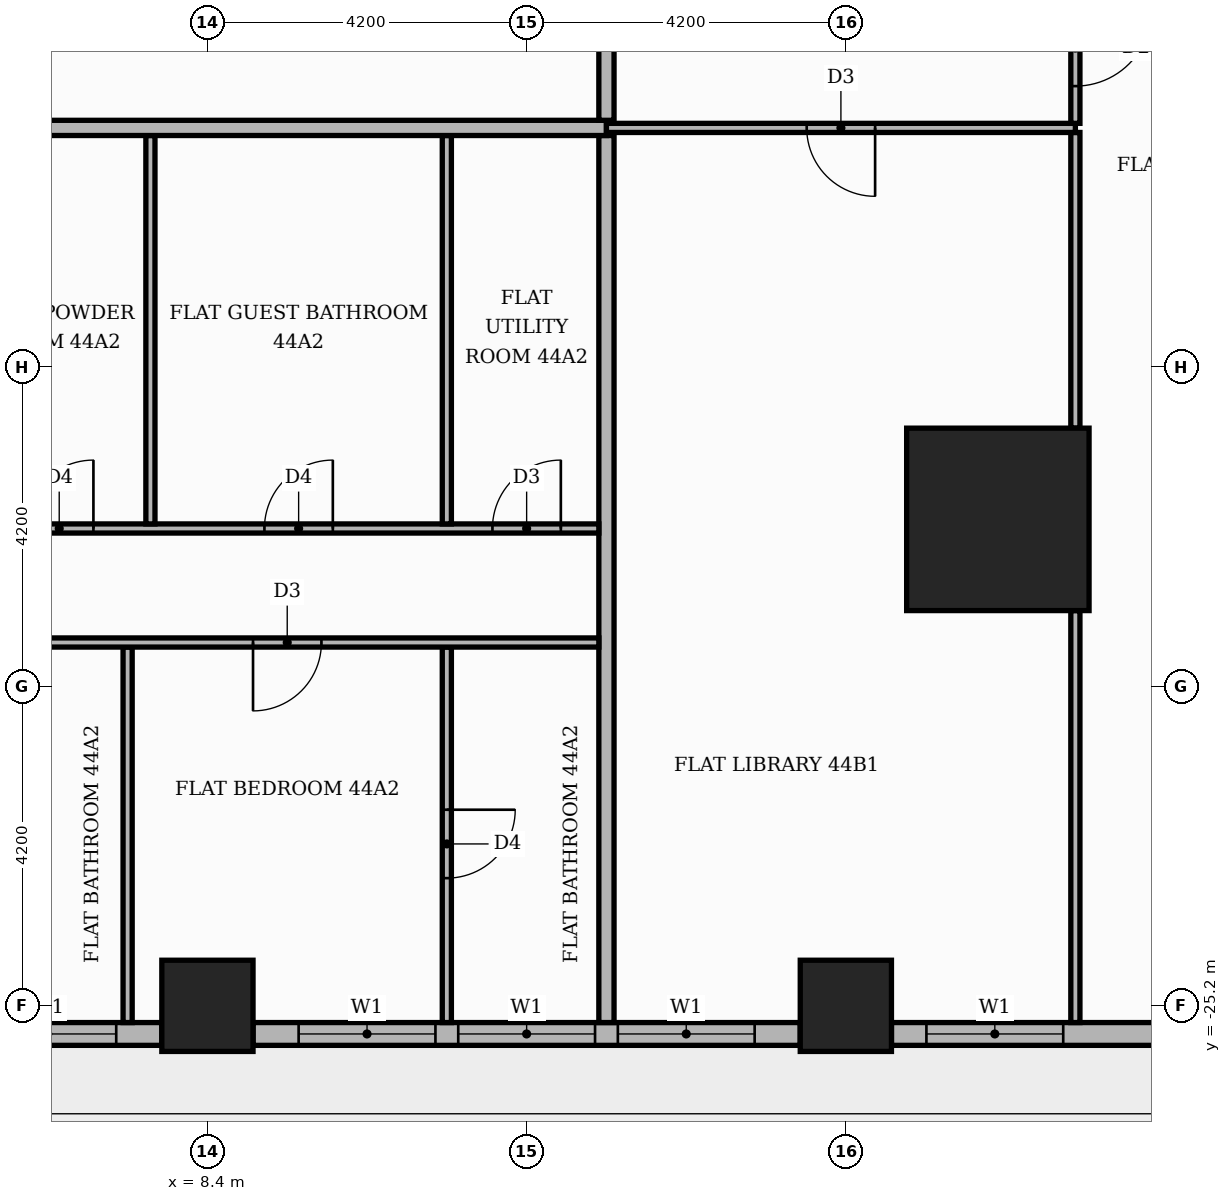
"""IFC4 building model, lengths in metres.
Left out: names, types, materials, properties, quantities, classifications, styles, units other than length and angle.
Written with IfcOpenShell. Run it as: python <this file> out.ifc"""

import sys

from ifc_helpers import new_model, si_unit, direction, frame, frame_2d, origin, origin_2d, place, context, subcontext, project, spatial, rectangle, extrude, element, fill, save


model = new_model("IFC4")
c1 = context("Model", 3, precision=1e-05, world=origin(), true_north=direction((0.0, 1.0)))
c2 = subcontext(c1, "Body", "Model", "MODEL_VIEW")
j1 = project(units=[si_unit("LENGTHUNIT", "METRE"), si_unit("PLANEANGLEUNIT", "RADIAN")], contexts=[c1])
p1 = place(None, origin())
s1 = spatial("IfcSite", under=j1, at=p1, CompositionType="ELEMENT")
p2 = place(p1, origin())
s2 = spatial("IfcBuilding", under=s1, at=p2, CompositionType="ELEMENT")
p3 = place(p2, frame((0.0, 0.0, 188.4)))
s3 = spatial("IfcBuildingStorey", under=s2, at=p3, CompositionType="ELEMENT", Elevation=188.4)
p4 = place(p3, frame((18.8, -18.8, 0.0), z_axis=(0.0, 0.0, 1.0), x_axis=(1.0, 0.0, 0.0)))
e1 = element("IfcColumn", 1, at=p4, inside=s3, PredefinedType="COLUMN", context=c2, shape_type="SweptSolid", body=[
    extrude(rectangle(XDim=2.4, YDim=2.4, at=origin_2d()), origin(), (0.0, 0.0, 1.0), 3.9),
])
for number, where, z_axis, x_axis in (
    (2, (8.4, -25.2, 0.0), (0.0, 0.0, 1.0), (1.0, 0.0, 0.0)),
    (3, (16.8, -25.2, 0.0), (0.0, 0.0, 1.0), (1.0, 0.0, 0.0)),
):
    element("IfcColumn", number, at=place(p3, frame(where, z_axis=z_axis, x_axis=x_axis)), inside=s3, PredefinedType="COLUMN", context=c2, shape_type="SweptSolid", body=[
        extrude(rectangle(XDim=1.2, YDim=1.2, at=origin_2d()), origin(), (0.0, 0.0, 1.0), 3.9),
    ])
p5 = place(p3, frame((0.6, -25.57, 0.0), z_axis=(0.0, 0.0, 1.0), x_axis=(1.0, 0.0, 0.0)))
e4 = element("IfcWall", 4, at=p5, inside=s3, PredefinedType="STANDARD", context=c2, shape_type="SweptSolid", body=[
    extrude(rectangle(XDim=7.2, YDim=0.3, at=frame_2d((3.6, 0.0))), origin(), (0.0, 0.0, 1.0), 3.48),
])
p6 = place(p5, frame((0.6, 0.0, 0.0)))
e5 = element("IfcOpeningElement", 5, at=p6, cuts=e4, PredefinedType="OPENING", context=c2, shape_type="SweptSolid", body=[
    extrude(rectangle(XDim=1.8, YDim=2.4, at=frame_2d((0.9, 1.2))), frame((0.0, 0.16, 0.0), z_axis=(0.0, -1.0, 0.0), x_axis=(1.0, 0.0, 0.0)), (0.0, 0.0, 1.0), 0.32),
])
p7 = place(p5, frame((2.7, 0.0, 0.9)))
e6 = element("IfcOpeningElement", 6, at=p7, cuts=e4, PredefinedType="OPENING", context=c2, shape_type="SweptSolid", body=[
    extrude(rectangle(XDim=1.8, YDim=2.1, at=frame_2d((0.9, 1.05))), frame((0.0, 0.16, 0.0), z_axis=(0.0, -1.0, 0.0), x_axis=(1.0, 0.0, 0.0)), (0.0, 0.0, 1.0), 0.32),
])
p8 = place(p5, frame((4.8, 0.0, 0.9)))
e7 = element("IfcOpeningElement", 7, at=p8, cuts=e4, PredefinedType="OPENING", context=c2, shape_type="SweptSolid", body=[
    extrude(rectangle(XDim=1.8, YDim=2.1, at=frame_2d((0.9, 1.05))), frame((0.0, 0.16, 0.0), z_axis=(0.0, -1.0, 0.0), x_axis=(1.0, 0.0, 0.0)), (0.0, 0.0, 1.0), 0.32),
])
p9 = place(p3, frame((9.0, -25.57, 0.0), z_axis=(0.0, 0.0, 1.0), x_axis=(1.0, 0.0, 0.0)))
e8 = element("IfcWall", 8, at=p9, inside=s3, PredefinedType="STANDARD", context=c2, shape_type="SweptSolid", body=[
    extrude(rectangle(XDim=7.2, YDim=0.3, at=frame_2d((3.6, 0.0))), origin(), (0.0, 0.0, 1.0), 3.48),
])
p10 = place(p9, frame((0.6, 0.0, 0.9)))
e9 = element("IfcOpeningElement", 9, at=p10, cuts=e8, PredefinedType="OPENING", context=c2, shape_type="SweptSolid", body=[
    extrude(rectangle(XDim=1.8, YDim=2.1, at=frame_2d((0.9, 1.05))), frame((0.0, 0.16, 0.0), z_axis=(0.0, -1.0, 0.0), x_axis=(1.0, 0.0, 0.0)), (0.0, 0.0, 1.0), 0.32),
])
p11 = place(p9, frame((2.7, 0.0, 0.9)))
e10 = element("IfcOpeningElement", 10, at=p11, cuts=e8, PredefinedType="OPENING", context=c2, shape_type="SweptSolid", body=[
    extrude(rectangle(XDim=1.8, YDim=2.1, at=frame_2d((0.9, 1.05))), frame((0.0, 0.16, 0.0), z_axis=(0.0, -1.0, 0.0), x_axis=(1.0, 0.0, 0.0)), (0.0, 0.0, 1.0), 0.32),
])
p12 = place(p9, frame((4.8, 0.0, 0.9)))
e11 = element("IfcOpeningElement", 11, at=p12, cuts=e8, PredefinedType="OPENING", context=c2, shape_type="SweptSolid", body=[
    extrude(rectangle(XDim=1.8, YDim=2.1, at=frame_2d((0.9, 1.05))), frame((0.0, 0.16, 0.0), z_axis=(0.0, -1.0, 0.0), x_axis=(1.0, 0.0, 0.0)), (0.0, 0.0, 1.0), 0.32),
])
p13 = place(p3, frame((17.4, -25.57, 0.0), z_axis=(0.0, 0.0, 1.0), x_axis=(1.0, 0.0, 0.0)))
e12 = element("IfcWall", 12, at=p13, inside=s3, PredefinedType="STANDARD", context=c2, shape_type="SweptSolid", body=[
    extrude(rectangle(XDim=3.82, YDim=0.3, at=frame_2d((1.91, 0.0))), origin(), (0.0, 0.0, 1.0), 3.48),
])
p14 = place(p13, frame((0.46, 0.0, 0.9)))
e13 = element("IfcOpeningElement", 13, at=p14, cuts=e12, PredefinedType="OPENING", context=c2, shape_type="SweptSolid", body=[
    extrude(rectangle(XDim=1.8, YDim=2.1, at=frame_2d((0.9, 1.05))), frame((0.0, 0.16, 0.0), z_axis=(0.0, -1.0, 0.0), x_axis=(1.0, 0.0, 0.0)), (0.0, 0.0, 1.0), 0.32),
])
p15 = place(p3, frame((7.35, -25.42, 0.0), z_axis=(0.0, 0.0, 1.0), x_axis=(0.0, 1.0, 0.0)))
e14 = element("IfcWall", 14, at=p15, inside=s3, PredefinedType="PARTITIONING", context=c2, shape_type="SweptSolid", body=[
    extrude(rectangle(XDim=4.94, YDim=0.12, at=frame_2d((2.47, 0.0))), origin(), (0.0, 0.0, 1.0), 3.48),
])
p16 = place(p3, frame((11.55, -25.42, 0.0), z_axis=(0.0, 0.0, 1.0), x_axis=(0.0, 1.0, 0.0)))
e15 = element("IfcWall", 15, at=p16, inside=s3, PredefinedType="PARTITIONING", context=c2, shape_type="SweptSolid", body=[
    extrude(rectangle(XDim=4.94, YDim=0.12, at=frame_2d((2.47, 0.0))), origin(), (0.0, 0.0, 1.0), 3.48),
])
p17 = place(p16, frame((1.9, 0.0, 0.0)))
e16 = element("IfcOpeningElement", 16, at=p17, cuts=e15, PredefinedType="OPENING", context=c2, shape_type="SweptSolid", body=[
    extrude(rectangle(XDim=0.9, YDim=2.1, at=frame_2d((0.45, 1.05))), frame((0.0, 0.07, 0.0), z_axis=(0.0, -1.0, 0.0), x_axis=(1.0, 0.0, 0.0)), (0.0, 0.0, 1.0), 0.14),
])
p18 = place(p3, frame((13.65, -25.42, 0.0), z_axis=(0.0, 0.0, 1.0), x_axis=(0.0, 1.0, 0.0)))
e17 = element("IfcWall", 17, at=p18, inside=s3, PredefinedType="PARTITIONING", context=c2, shape_type="SweptSolid", body=[
    extrude(rectangle(XDim=11.67, YDim=0.2, at=frame_2d((5.835, 0.0))), origin(), (0.0, 0.0, 1.0), 3.48),
])
p19 = place(p3, frame((19.82, -25.42, 0.0), z_axis=(0.0, 0.0, 1.0), x_axis=(0.0, 1.0, 0.0)))
e18 = element("IfcWall", 18, at=p19, inside=s3, PredefinedType="PARTITIONING", context=c2, shape_type="SweptSolid", body=[
    extrude(rectangle(XDim=5.42, YDim=0.12, at=frame_2d((2.71, 0.0))), origin(), (0.0, 0.0, 1.0), 3.48),
])
p20 = place(p3, frame((-5.15, -20.42, 0.0), z_axis=(0.0, 0.0, 1.0), x_axis=(1.0, 0.0, 0.0)))
e19 = element("IfcWall", 19, at=p20, inside=s3, PredefinedType="PARTITIONING", context=c2, shape_type="SweptSolid", body=[
    extrude(rectangle(XDim=18.7, YDim=0.12, at=frame_2d((9.35, 0.0))), origin(), (0.0, 0.0, 1.0), 3.48),
])
p21 = place(p20, frame((1.5, 0.0, 0.0)))
e20 = element("IfcOpeningElement", 20, at=p21, cuts=e19, PredefinedType="OPENING", context=c2, shape_type="SweptSolid", body=[
    extrude(rectangle(XDim=1.0, YDim=2.1, at=frame_2d((0.5, 1.05))), frame((0.0, 0.07, 0.0), z_axis=(0.0, -1.0, 0.0), x_axis=(1.0, 0.0, 0.0)), (0.0, 0.0, 1.0), 0.14),
])
p22 = place(p20, frame((5.75, 0.0, 0.0)))
e21 = element("IfcOpeningElement", 21, at=p22, cuts=e19, PredefinedType="OPENING", context=c2, shape_type="SweptSolid", body=[
    extrude(rectangle(XDim=0.9, YDim=2.1, at=frame_2d((0.45, 1.05))), frame((0.0, 0.07, 0.0), z_axis=(0.0, -1.0, 0.0), x_axis=(1.0, 0.0, 0.0)), (0.0, 0.0, 1.0), 0.14),
])
p23 = place(p20, frame((14.15, 0.0, 0.0)))
e22 = element("IfcOpeningElement", 22, at=p23, cuts=e19, PredefinedType="OPENING", context=c2, shape_type="SweptSolid", body=[
    extrude(rectangle(XDim=0.9, YDim=2.1, at=frame_2d((0.45, 1.05))), frame((0.0, 0.07, 0.0), z_axis=(0.0, -1.0, 0.0), x_axis=(1.0, 0.0, 0.0)), (0.0, 0.0, 1.0), 0.14),
])
p24 = place(p3, frame((-1.05, -18.92, 0.0), z_axis=(0.0, 0.0, 1.0), x_axis=(1.0, 0.0, 0.0)))
e23 = element("IfcWall", 23, at=p24, inside=s3, PredefinedType="PARTITIONING", context=c2, shape_type="SweptSolid", body=[
    extrude(rectangle(XDim=14.6, YDim=0.12, at=frame_2d((7.3, 0.0))), origin(), (0.0, 0.0, 1.0), 3.48),
])
p25 = place(p24, frame((2.7, 0.0, 0.0)))
e24 = element("IfcOpeningElement", 24, at=p25, cuts=e23, PredefinedType="OPENING", context=c2, shape_type="SweptSolid", body=[
    extrude(rectangle(XDim=0.9, YDim=2.1, at=frame_2d((0.45, 1.05))), frame((0.0, 0.07, 0.0), z_axis=(0.0, -1.0, 0.0), x_axis=(1.0, 0.0, 0.0)), (0.0, 0.0, 1.0), 0.14),
])
p26 = place(p24, frame((7.05, 0.0, 0.0)))
e25 = element("IfcOpeningElement", 25, at=p26, cuts=e23, PredefinedType="OPENING", context=c2, shape_type="SweptSolid", body=[
    extrude(rectangle(XDim=0.9, YDim=2.1, at=frame_2d((0.45, 1.05))), frame((0.0, 0.07, 0.0), z_axis=(0.0, -1.0, 0.0), x_axis=(1.0, 0.0, 0.0)), (0.0, 0.0, 1.0), 0.14),
])
p27 = place(p24, frame((10.2, 0.0, 0.0)))
e26 = element("IfcOpeningElement", 26, at=p27, cuts=e23, PredefinedType="OPENING", context=c2, shape_type="SweptSolid", body=[
    extrude(rectangle(XDim=0.9, YDim=2.1, at=frame_2d((0.45, 1.05))), frame((0.0, 0.07, 0.0), z_axis=(0.0, -1.0, 0.0), x_axis=(1.0, 0.0, 0.0)), (0.0, 0.0, 1.0), 0.14),
])
p28 = place(p24, frame((13.2, 0.0, 0.0)))
e27 = element("IfcOpeningElement", 27, at=p28, cuts=e23, PredefinedType="OPENING", context=c2, shape_type="SweptSolid", body=[
    extrude(rectangle(XDim=0.9, YDim=2.1, at=frame_2d((0.45, 1.05))), frame((0.0, 0.07, 0.0), z_axis=(0.0, -1.0, 0.0), x_axis=(1.0, 0.0, 0.0)), (0.0, 0.0, 1.0), 0.14),
])
for number, where, z_axis, x_axis in (
    (28, (7.65, -18.86, 0.0), (0.0, 0.0, 1.0), (0.0, 1.0, 0.0)),
    (29, (11.55, -18.86, 0.0), (0.0, 0.0, 1.0), (0.0, 1.0, 0.0)),
):
    element("IfcWall", number, at=place(p3, frame(where, z_axis=z_axis, x_axis=x_axis)), inside=s3, PredefinedType="PARTITIONING", context=c2, shape_type="SweptSolid", body=[
        extrude(rectangle(XDim=5.11, YDim=0.12, at=frame_2d((2.555, 0.0))), origin(), (0.0, 0.0, 1.0), 3.48),
    ])
p29 = place(p3, frame((19.82, -17.6, 0.0), z_axis=(0.0, 0.0, 1.0), x_axis=(0.0, 1.0, 0.0)))
e30 = element("IfcWall", 30, at=p29, inside=s3, PredefinedType="PARTITIONING", context=c2, shape_type="SweptSolid", body=[
    extrude(rectangle(XDim=3.89, YDim=0.12, at=frame_2d((1.945, 0.0))), origin(), (0.0, 0.0, 1.0), 3.48),
])
p30 = place(p3, frame((-25.42, -13.65, 0.0), z_axis=(0.0, 0.0, 1.0), x_axis=(1.0, 0.0, 0.0)))
e31 = element("IfcWall", 31, at=p30, inside=s3, PredefinedType="PARTITIONING", context=c2, shape_type="SweptSolid", body=[
    extrude(rectangle(XDim=39.07, YDim=0.2, at=frame_2d((19.535, 0.0))), origin(), (0.0, 0.0, 1.0), 3.48),
])
p31 = place(p30, frame((13.32, 0.0, 0.0)))
e32 = element("IfcOpeningElement", 32, at=p31, cuts=e31, PredefinedType="OPENING", context=c2, shape_type="SweptSolid", body=[
    extrude(rectangle(XDim=1.1, YDim=2.4, at=frame_2d((0.55, 1.2))), frame((0.0, 0.11, 0.0), z_axis=(0.0, -1.0, 0.0), x_axis=(1.0, 0.0, 0.0)), (0.0, 0.0, 1.0), 0.22),
])
p32 = place(p30, frame((21.72, 0.0, 0.0)))
e33 = element("IfcOpeningElement", 33, at=p32, cuts=e31, PredefinedType="OPENING", context=c2, shape_type="SweptSolid", body=[
    extrude(rectangle(XDim=1.1, YDim=2.4, at=frame_2d((0.55, 1.2))), frame((0.0, 0.11, 0.0), z_axis=(0.0, -1.0, 0.0), x_axis=(1.0, 0.0, 0.0)), (0.0, 0.0, 1.0), 0.22),
])
p33 = place(p3, frame((13.65, -13.65, 0.0), z_axis=(0.0, 0.0, 1.0), x_axis=(1.0, 0.0, 0.0)))
e34 = element("IfcWall", 34, at=p33, inside=s3, PredefinedType="PARTITIONING", context=c2, shape_type="SweptSolid", body=[
    extrude(rectangle(XDim=6.17, YDim=0.12, at=frame_2d((3.085, 0.0))), origin(), (0.0, 0.0, 1.0), 3.48),
])
p34 = place(p33, frame((2.635, 0.0, 0.0)))
e35 = element("IfcOpeningElement", 35, at=p34, cuts=e34, PredefinedType="OPENING", context=c2, shape_type="SweptSolid", body=[
    extrude(rectangle(XDim=0.9, YDim=2.1, at=frame_2d((0.45, 1.05))), frame((0.0, 0.07, 0.0), z_axis=(0.0, -1.0, 0.0), x_axis=(1.0, 0.0, 0.0)), (0.0, 0.0, 1.0), 0.14),
])
p35 = place(p3, frame((19.82, -13.59, 0.0), z_axis=(0.0, 0.0, 1.0), x_axis=(0.0, 1.0, 0.0)))
e36 = element("IfcWall", 36, at=p35, inside=s3, PredefinedType="PARTITIONING", context=c2, shape_type="SweptSolid", body=[
    extrude(rectangle(XDim=1.98, YDim=0.12, at=frame_2d((0.99, 0.0))), origin(), (0.0, 0.0, 1.0), 3.48),
])
p36 = place(p35, frame((0.49, 0.0, 0.0)))
e37 = element("IfcOpeningElement", 37, at=p36, cuts=e36, PredefinedType="OPENING", context=c2, shape_type="SweptSolid", body=[
    extrude(rectangle(XDim=1.0, YDim=2.1, at=frame_2d((0.5, 1.05))), frame((0.0, 0.07, 0.0), z_axis=(0.0, -1.0, 0.0), x_axis=(1.0, 0.0, 0.0)), (0.0, 0.0, 1.0), 0.14),
])
p37 = place(p3, frame((13.65, -13.55, 0.0), z_axis=(0.0, 0.0, 1.0), x_axis=(0.0, 1.0, 0.0)))
e38 = element("IfcWall", 38, at=p37, inside=s3, PredefinedType="PARTITIONING", context=c2, shape_type="SweptSolid", body=[
    extrude(rectangle(XDim=2.45, YDim=0.2, at=frame_2d((1.225, 0.0))), origin(), (0.0, 0.0, 1.0), 3.48),
])
p38 = place(p8, origin())
e39 = element("IfcWindow", 39, at=p38, inside=s3, PartitioningType="SINGLE_PANEL", PredefinedType="WINDOW", context=c2, shape_type="SweptSolid", body=[
    extrude(rectangle(XDim=1.8, YDim=2.1, at=frame_2d((0.9, 1.05))), frame((0.0, 0.03, 0.0), z_axis=(0.0, -1.0, 0.0), x_axis=(1.0, 0.0, 0.0)), (0.0, 0.0, 1.0), 0.06),
])
fill(e7, e39)
p39 = place(p10, origin())
e40 = element("IfcWindow", 40, at=p39, inside=s3, PartitioningType="SINGLE_PANEL", PredefinedType="WINDOW", context=c2, shape_type="SweptSolid", body=[
    extrude(rectangle(XDim=1.8, YDim=2.1, at=frame_2d((0.9, 1.05))), frame((0.0, 0.03, 0.0), z_axis=(0.0, -1.0, 0.0), x_axis=(1.0, 0.0, 0.0)), (0.0, 0.0, 1.0), 0.06),
])
fill(e9, e40)
p40 = place(p11, origin())
e41 = element("IfcWindow", 41, at=p40, inside=s3, PartitioningType="SINGLE_PANEL", PredefinedType="WINDOW", context=c2, shape_type="SweptSolid", body=[
    extrude(rectangle(XDim=1.8, YDim=2.1, at=frame_2d((0.9, 1.05))), frame((0.0, 0.03, 0.0), z_axis=(0.0, -1.0, 0.0), x_axis=(1.0, 0.0, 0.0)), (0.0, 0.0, 1.0), 0.06),
])
fill(e10, e41)
p41 = place(p12, origin())
e42 = element("IfcWindow", 42, at=p41, inside=s3, PartitioningType="SINGLE_PANEL", PredefinedType="WINDOW", context=c2, shape_type="SweptSolid", body=[
    extrude(rectangle(XDim=1.8, YDim=2.1, at=frame_2d((0.9, 1.05))), frame((0.0, 0.03, 0.0), z_axis=(0.0, -1.0, 0.0), x_axis=(1.0, 0.0, 0.0)), (0.0, 0.0, 1.0), 0.06),
])
fill(e11, e42)
p42 = place(p14, origin())
e43 = element("IfcWindow", 43, at=p42, inside=s3, PartitioningType="SINGLE_PANEL", PredefinedType="WINDOW", context=c2, shape_type="SweptSolid", body=[
    extrude(rectangle(XDim=1.8, YDim=2.1, at=frame_2d((0.9, 1.05))), frame((0.0, 0.03, 0.0), z_axis=(0.0, -1.0, 0.0), x_axis=(1.0, 0.0, 0.0)), (0.0, 0.0, 1.0), 0.06),
])
fill(e13, e43)
p43 = place(p26, origin())
e44 = element("IfcDoor", 44, at=p43, inside=s3, OperationType="SINGLE_SWING_RIGHT", PredefinedType="DOOR", context=c2, shape_type="SweptSolid", body=[
    extrude(rectangle(XDim=0.9, YDim=2.1, at=frame_2d((0.45, 1.05))), frame((0.0, 0.025, 0.0), z_axis=(0.0, -1.0, 0.0), x_axis=(1.0, 0.0, 0.0)), (0.0, 0.0, 1.0), 0.05),
])
fill(e25, e44)
p44 = place(p27, origin())
e45 = element("IfcDoor", 45, at=p44, inside=s3, OperationType="SINGLE_SWING_RIGHT", PredefinedType="DOOR", context=c2, shape_type="SweptSolid", body=[
    extrude(rectangle(XDim=0.9, YDim=2.1, at=frame_2d((0.45, 1.05))), frame((0.0, 0.025, 0.0), z_axis=(0.0, -1.0, 0.0), x_axis=(1.0, 0.0, 0.0)), (0.0, 0.0, 1.0), 0.05),
])
fill(e26, e45)
p45 = place(p28, origin())
e46 = element("IfcDoor", 46, at=p45, inside=s3, OperationType="SINGLE_SWING_RIGHT", PredefinedType="DOOR", context=c2, shape_type="SweptSolid", body=[
    extrude(rectangle(XDim=0.9, YDim=2.1, at=frame_2d((0.45, 1.05))), frame((0.0, 0.025, 0.0), z_axis=(0.0, -1.0, 0.0), x_axis=(1.0, 0.0, 0.0)), (0.0, 0.0, 1.0), 0.05),
])
fill(e27, e46)
p46 = place(p23, frame((0.9, 0.0, 0.0), z_axis=(0.0, 0.0, 1.0), x_axis=(-1.0, 0.0, 0.0)))
e47 = element("IfcDoor", 47, at=p46, inside=s3, OperationType="SINGLE_SWING_LEFT", PredefinedType="DOOR", context=c2, shape_type="SweptSolid", body=[
    extrude(rectangle(XDim=0.9, YDim=2.1, at=frame_2d((0.45, 1.05))), frame((0.0, 0.025, 0.0), z_axis=(0.0, -1.0, 0.0), x_axis=(1.0, 0.0, 0.0)), (0.0, 0.0, 1.0), 0.05),
])
fill(e22, e47)
p47 = place(p17, frame((0.9, 0.0, 0.0), z_axis=(0.0, 0.0, 1.0), x_axis=(-1.0, 0.0, 0.0)))
e48 = element("IfcDoor", 48, at=p47, inside=s3, OperationType="SINGLE_SWING_RIGHT", PredefinedType="DOOR", context=c2, shape_type="SweptSolid", body=[
    extrude(rectangle(XDim=0.9, YDim=2.1, at=frame_2d((0.45, 1.05))), frame((0.0, 0.025, 0.0), z_axis=(0.0, -1.0, 0.0), x_axis=(1.0, 0.0, 0.0)), (0.0, 0.0, 1.0), 0.05),
])
fill(e16, e48)
p48 = place(p34, frame((0.9, 0.0, 0.0), z_axis=(0.0, 0.0, 1.0), x_axis=(-1.0, 0.0, 0.0)))
e49 = element("IfcDoor", 49, at=p48, inside=s3, OperationType="SINGLE_SWING_RIGHT", PredefinedType="DOOR", context=c2, shape_type="SweptSolid", body=[
    extrude(rectangle(XDim=0.9, YDim=2.1, at=frame_2d((0.45, 1.05))), frame((0.0, 0.025, 0.0), z_axis=(0.0, -1.0, 0.0), x_axis=(1.0, 0.0, 0.0)), (0.0, 0.0, 1.0), 0.05),
])
fill(e35, e49)
p49 = place(p36, frame((1.0, 0.0, 0.0), z_axis=(0.0, 0.0, 1.0), x_axis=(-1.0, 0.0, 0.0)))
e50 = element("IfcDoor", 50, at=p49, inside=s3, OperationType="SINGLE_SWING_RIGHT", PredefinedType="DOOR", context=c2, shape_type="SweptSolid", body=[
    extrude(rectangle(XDim=1.0, YDim=2.1, at=frame_2d((0.5, 1.05))), frame((0.0, 0.025, 0.0), z_axis=(0.0, -1.0, 0.0), x_axis=(1.0, 0.0, 0.0)), (0.0, 0.0, 1.0), 0.05),
])
fill(e37, e50)
save(model, sys.argv[1])
